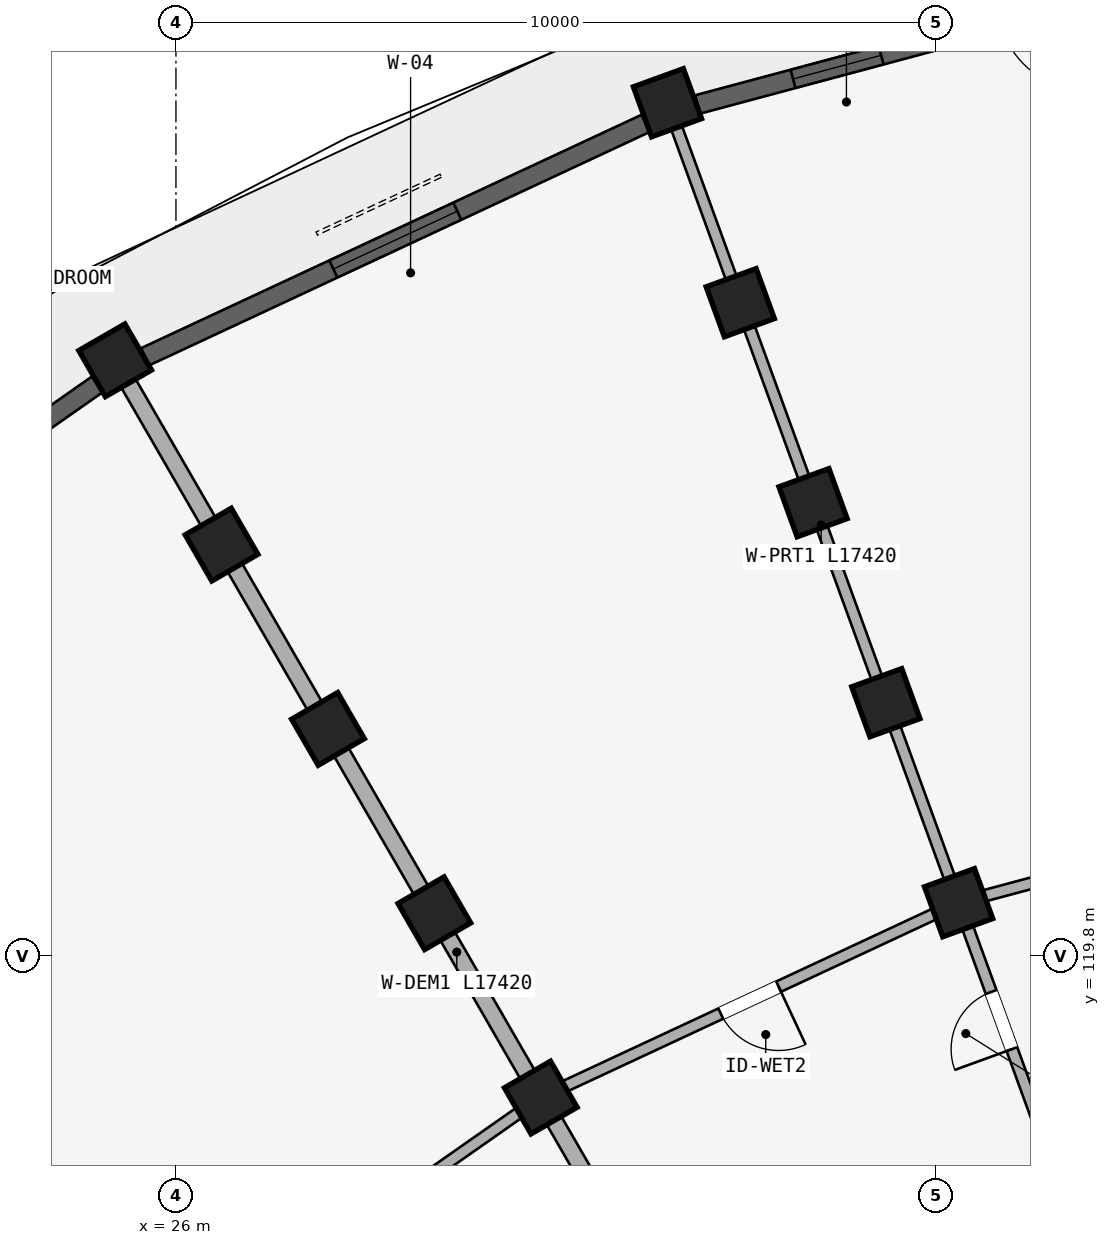
"""IFC4 building model, lengths in metres.
Left out: names, types, materials, properties, quantities, classifications, styles, units other than length and angle.
Written with IfcOpenShell. Run it as: python <this file> out.ifc"""

import sys

from ifc_helpers import new_model, si_unit, direction, frame, frame_2d, origin, origin_2d, place, context, subcontext, project, spatial, rectangle, extrude, element, fill, save


model = new_model("IFC4")
c1 = context("Model", 3, precision=1e-05, world=origin(), true_north=direction((0.0, 1.0)))
c2 = subcontext(c1, "Body", "Model", "MODEL_VIEW")
j1 = project(units=[si_unit("LENGTHUNIT", "METRE"), si_unit("PLANEANGLEUNIT", "RADIAN")], contexts=[c1])
p1 = place(None, origin())
s1 = spatial("IfcSite", under=j1, at=p1, CompositionType="ELEMENT")
p2 = place(p1, origin())
s2 = spatial("IfcBuilding", under=s1, at=p2, CompositionType="ELEMENT")
p3 = place(p2, frame((0.0, 0.0, 18.15)))
s3 = spatial("IfcBuildingStorey", under=s2, at=p3, CompositionType="ELEMENT", Elevation=18.15)
for number, where, z_axis, x_axis in (
    (1, (36.298, 120.501, 0.0), (0.0, 0.0, 1.0), (0.94, 0.342, 0.0)),
    (2, (35.34, 123.132, 0.0), (0.0, 0.0, 1.0), (0.94, 0.342, 0.0)),
    (3, (34.382, 125.764, 0.0), (0.0, 0.0, 1.0), (0.94, 0.342, 0.0)),
    (4, (33.425, 128.395, 0.0), (0.0, 0.0, 1.0), (0.94, 0.342, 0.0)),
    (5, (32.467, 131.026, 0.0), (0.0, 0.0, 1.0), (0.94, 0.342, 0.0)),
    (6, (30.8, 117.938, 0.0), (0.0, 0.0, 1.0), (0.866, 0.5, 0.0)),
    (7, (29.4, 120.363, 0.0), (0.0, 0.0, 1.0), (0.866, 0.5, 0.0)),
    (8, (28.0, 122.787, 0.0), (0.0, 0.0, 1.0), (0.866, 0.5, 0.0)),
    (9, (26.6, 125.212, 0.0), (0.0, 0.0, 1.0), (0.866, 0.5, 0.0)),
    (10, (25.2, 127.637, 0.0), (0.0, 0.0, 1.0), (0.866, 0.5, 0.0)),
    (11, (24.031, 116.603, 0.0), (0.0, 0.0, 1.0), (0.766, 0.643, 0.0)),
):
    element("IfcColumn", number, at=place(p3, frame(where, z_axis=z_axis, x_axis=x_axis)), inside=s3, PredefinedType="COLUMN", context=c2, shape_type="SweptSolid", body=[
        extrude(rectangle(XDim=0.7, YDim=0.7, at=origin_2d()), origin(), (0.0, 0.0, 1.0), 2.93),
    ])
p4 = place(p3, frame((38.521, 114.393, 0.0), z_axis=(0.0, 0.0, 1.0), x_axis=(-0.342022120477, 0.939691901159, 0.0)))
e12 = element("IfcWall", 12, at=p4, inside=s3, PredefinedType="PARTITIONING", context=c2, shape_type="SweptSolid", body=[
    extrude(rectangle(XDim=17.42, YDim=0.15, at=frame_2d((8.71, 0.0))), origin(), (0.0, 0.0, 1.0), 2.372),
])
p5 = place(p4, frame((4.45, 0.0, 0.0)))
e13 = element("IfcOpeningElement", 13, at=p5, cuts=e12, PredefinedType="OPENING", context=c2, shape_type="SweptSolid", body=[
    extrude(rectangle(XDim=0.8, YDim=2.1, at=frame_2d((0.4, 1.05))), frame((0.0, 0.085, 0.0), z_axis=(0.0, -1.0, 0.0), x_axis=(1.0, 0.0, 0.0)), (0.0, 0.0, 1.0), 0.17),
])
p6 = place(p3, frame((34.05, 112.309, 0.0), z_axis=(0.0, 0.0, 1.0), x_axis=(-0.499997843263, 0.866026648973, 0.0)))
e14 = element("IfcWall", 14, at=p6, inside=s3, PredefinedType="STANDARD", context=c2, shape_type="SweptSolid", body=[
    extrude(rectangle(XDim=17.42, YDim=0.22, at=frame_2d((8.71, 0.0))), origin(), (0.0, 0.0, 1.0), 2.372),
])
p7 = place(p3, frame((30.009, 109.479, 0.0), z_axis=(0.0, 0.0, 1.0), x_axis=(-0.642784757967, 0.766046835987, 0.0)))
e15 = element("IfcWall", 15, at=p7, inside=s3, PredefinedType="PARTITIONING", context=c2, shape_type="SweptSolid", body=[
    extrude(rectangle(XDim=17.42, YDim=0.15, at=frame_2d((8.71, 0.0))), origin(), (0.0, 0.0, 1.0), 2.372),
])
p8 = place(p7, frame((4.45, 0.0, 0.0)))
e16 = element("IfcOpeningElement", 16, at=p8, cuts=e15, PredefinedType="OPENING", context=c2, shape_type="SweptSolid", body=[
    extrude(rectangle(XDim=0.8, YDim=2.1, at=frame_2d((0.4, 1.05))), frame((0.0, 0.085, 0.0), z_axis=(0.0, -1.0, 0.0), x_axis=(1.0, 0.0, 0.0)), (0.0, 0.0, 1.0), 0.17),
])
p9 = place(p3, frame((26.521, 105.991, 0.0), z_axis=(0.0, 0.0, 1.0), x_axis=(-0.766046835987, 0.642784757967, 0.0)))
e17 = element("IfcWall", 17, at=p9, inside=s3, PredefinedType="PARTITIONING", context=c2, shape_type="SweptSolid", body=[
    extrude(rectangle(XDim=17.42, YDim=0.15, at=frame_2d((8.71, 0.0))), origin(), (0.0, 0.0, 1.0), 2.372),
])
p10 = place(p9, frame((4.45, 0.0, 0.0)))
e18 = element("IfcOpeningElement", 18, at=p10, cuts=e17, PredefinedType="OPENING", context=c2, shape_type="SweptSolid", body=[
    extrude(rectangle(XDim=0.8, YDim=2.1, at=frame_2d((0.4, 1.05))), frame((0.0, 0.085, 0.0), z_axis=(0.0, -1.0, 0.0), x_axis=(1.0, 0.0, 0.0)), (0.0, 0.0, 1.0), 0.17),
])
p11 = place(p3, frame((42.157, 122.071, 0.0), z_axis=(0.0, 0.0, 1.0), x_axis=(-0.965923618901, -0.258827283048, 0.0)))
e19 = element("IfcWall", 19, at=p11, inside=s3, PredefinedType="PLUMBINGWALL", context=c2, shape_type="SweptSolid", body=[
    extrude(rectangle(XDim=6.066, YDim=0.15, at=frame_2d((3.033, 0.0))), origin(), (0.0, 0.0, 1.0), 2.372),
])
p12 = place(p11, frame((2.633, 0.0, 0.0)))
e20 = element("IfcOpeningElement", 20, at=p12, cuts=e19, PredefinedType="OPENING", context=c2, shape_type="SweptSolid", body=[
    extrude(rectangle(XDim=0.8, YDim=2.1, at=frame_2d((0.4, 1.05))), frame((0.0, 0.085, 0.0), z_axis=(0.0, -1.0, 0.0), x_axis=(1.0, 0.0, 0.0)), (0.0, 0.0, 1.0), 0.17),
])
p13 = place(p3, frame((36.298, 120.501, 0.0), z_axis=(0.0, 0.0, 1.0), x_axis=(-0.906312656069, -0.42260781991, 0.0)))
e21 = element("IfcWall", 21, at=p13, inside=s3, PredefinedType="PLUMBINGWALL", context=c2, shape_type="SweptSolid", body=[
    extrude(rectangle(XDim=6.066, YDim=0.15, at=frame_2d((3.033, 0.0))), origin(), (0.0, 0.0, 1.0), 2.372),
])
p14 = place(p13, frame((2.613, 0.0, 0.0)))
e22 = element("IfcOpeningElement", 22, at=p14, cuts=e21, PredefinedType="OPENING", context=c2, shape_type="SweptSolid", body=[
    extrude(rectangle(XDim=0.84, YDim=2.1, at=frame_2d((0.42, 1.05))), frame((0.0, 0.085, 0.0), z_axis=(0.0, -1.0, 0.0), x_axis=(1.0, 0.0, 0.0)), (0.0, 0.0, 1.0), 0.17),
])
p15 = place(p3, frame((30.8, 117.938, 0.0), z_axis=(0.0, 0.0, 1.0), x_axis=(-0.81913926159, -0.573594691504, 0.0)))
e23 = element("IfcWall", 23, at=p15, inside=s3, PredefinedType="PLUMBINGWALL", context=c2, shape_type="SweptSolid", body=[
    extrude(rectangle(XDim=6.066, YDim=0.15, at=frame_2d((3.033, 0.0))), origin(), (0.0, 0.0, 1.0), 2.372),
])
p16 = place(p15, frame((2.653, 0.0, 0.0)))
e24 = element("IfcOpeningElement", 24, at=p16, cuts=e23, PredefinedType="OPENING", context=c2, shape_type="SweptSolid", body=[
    extrude(rectangle(XDim=0.76, YDim=2.05, at=frame_2d((0.38, 1.025))), frame((0.0, 0.085, 0.0), z_axis=(0.0, -1.0, 0.0), x_axis=(1.0, 0.0, 0.0)), (0.0, 0.0, 1.0), 0.17),
])
p17 = place(p3, frame((39.882, 132.883, 0.0), z_axis=(0.0, 0.0, 1.0), x_axis=(-0.965930355787, -0.258802140196, 0.0)))
e25 = element("IfcWall", 25, at=p17, inside=s3, PredefinedType="STANDARD", context=c2, shape_type="SweptSolid", body=[
    extrude(rectangle(XDim=7.267, YDim=0.25, at=frame_2d((3.633, 0.0))), origin(), (0.0, 0.0, 1.0), 2.372),
])
p18 = place(p17, frame((4.766, 0.0, 0.322)))
e26 = element("IfcOpeningElement", 26, at=p18, cuts=e25, PredefinedType="OPENING", context=c2, shape_type="SweptSolid", body=[
    extrude(rectangle(XDim=1.2, YDim=1.5, at=frame_2d((0.6, 0.75))), frame((0.0, 0.135, 0.0), z_axis=(0.0, -1.0, 0.0), x_axis=(1.0, 0.0, 0.0)), (0.0, 0.0, 1.0), 0.27),
])
p19 = place(p17, frame((1.943, 0.0, 0.0)))
e27 = element("IfcOpeningElement", 27, at=p19, cuts=e25, PredefinedType="OPENING", context=c2, shape_type="SweptSolid", body=[
    extrude(rectangle(XDim=1.2, YDim=2.15, at=frame_2d((0.6, 1.075))), frame((0.0, 0.135, 0.0), z_axis=(0.0, -1.0, 0.0), x_axis=(1.0, 0.0, 0.0)), (0.0, 0.0, 1.0), 0.27),
])
p20 = place(p3, frame((32.179, 130.754, 0.0), z_axis=(0.0, 0.0, 1.0), x_axis=(-0.90630327107, -0.422627946127, 0.0)))
e28 = element("IfcWall", 28, at=p20, inside=s3, PredefinedType="STANDARD", context=c2, shape_type="SweptSolid", body=[
    extrude(rectangle(XDim=7.267, YDim=0.25, at=frame_2d((3.633, 0.0))), origin(), (0.0, 0.0, 1.0), 2.372),
])
p21 = place(p20, frame((2.733, 0.0, 0.522)))
e29 = element("IfcOpeningElement", 29, at=p21, cuts=e28, PredefinedType="OPENING", context=c2, shape_type="SweptSolid", body=[
    extrude(rectangle(XDim=1.8, YDim=1.65, at=frame_2d((0.9, 0.825))), frame((0.0, 0.135, 0.0), z_axis=(0.0, -1.0, 0.0), x_axis=(1.0, 0.0, 0.0)), (0.0, 0.0, 1.0), 0.27),
])
p22 = place(p3, frame((24.964, 127.319, 0.0), z_axis=(0.0, 0.0, 1.0), x_axis=(-0.819159308599, -0.573566061701, 0.0)))
e30 = element("IfcWall", 30, at=p22, inside=s3, PredefinedType="STANDARD", context=c2, shape_type="SweptSolid", body=[
    extrude(rectangle(XDim=7.267, YDim=0.25, at=frame_2d((3.633, 0.0))), origin(), (0.0, 0.0, 1.0), 2.372),
])
p23 = place(p22, frame((2.808, 0.0, 0.422)))
e31 = element("IfcOpeningElement", 31, at=p23, cuts=e30, PredefinedType="OPENING", context=c2, shape_type="SweptSolid", body=[
    extrude(rectangle(XDim=1.65, YDim=1.75, at=frame_2d((0.825, 0.875))), frame((0.0, 0.135, 0.0), z_axis=(0.0, -1.0, 0.0), x_axis=(1.0, 0.0, 0.0)), (0.0, 0.0, 1.0), 0.27),
])
p24 = place(p18, origin())
e32 = element("IfcWindow", 32, at=p24, inside=s3, PartitioningType="SINGLE_PANEL", PredefinedType="WINDOW", context=c2, shape_type="SweptSolid", body=[
    extrude(rectangle(XDim=1.2, YDim=1.5, at=frame_2d((0.6, 0.75))), frame((0.0, 0.03, 0.0), z_axis=(0.0, -1.0, 0.0), x_axis=(1.0, 0.0, 0.0)), (0.0, 0.0, 1.0), 0.06),
])
fill(e26, e32)
p25 = place(p21, origin())
e33 = element("IfcWindow", 33, at=p25, inside=s3, PartitioningType="DOUBLE_PANEL_VERTICAL", PredefinedType="WINDOW", context=c2, shape_type="SweptSolid", body=[
    extrude(rectangle(XDim=1.8, YDim=1.65, at=frame_2d((0.9, 0.825))), frame((0.0, 0.03, 0.0), z_axis=(0.0, -1.0, 0.0), x_axis=(1.0, 0.0, 0.0)), (0.0, 0.0, 1.0), 0.06),
])
fill(e29, e33)
p26 = place(p5, frame((0.8, 0.0, 0.0), z_axis=(0.0, 0.0, 1.0), x_axis=(-1.0, 0.0, 0.0)))
e34 = element("IfcDoor", 34, at=p26, inside=s3, OperationType="SINGLE_SWING_RIGHT", PredefinedType="DOOR", context=c2, shape_type="SweptSolid", body=[
    extrude(rectangle(XDim=0.8, YDim=2.1, at=frame_2d((0.4, 1.05))), frame((0.0, 0.025, 0.0), z_axis=(0.0, -1.0, 0.0), x_axis=(1.0, 0.0, 0.0)), (0.0, 0.0, 1.0), 0.05),
])
fill(e13, e34)
p27 = place(p14, frame((0.84, 0.0, 0.0), z_axis=(0.0, 0.0, 1.0), x_axis=(-1.0, 0.0, 0.0)))
e35 = element("IfcDoor", 35, at=p27, inside=s3, OperationType="SINGLE_SWING_RIGHT", PredefinedType="DOOR", context=c2, shape_type="SweptSolid", body=[
    extrude(rectangle(XDim=0.84, YDim=2.1, at=frame_2d((0.42, 1.05))), frame((0.0, 0.025, 0.0), z_axis=(0.0, -1.0, 0.0), x_axis=(1.0, 0.0, 0.0)), (0.0, 0.0, 1.0), 0.05),
])
fill(e22, e35)
save(model, sys.argv[1])
